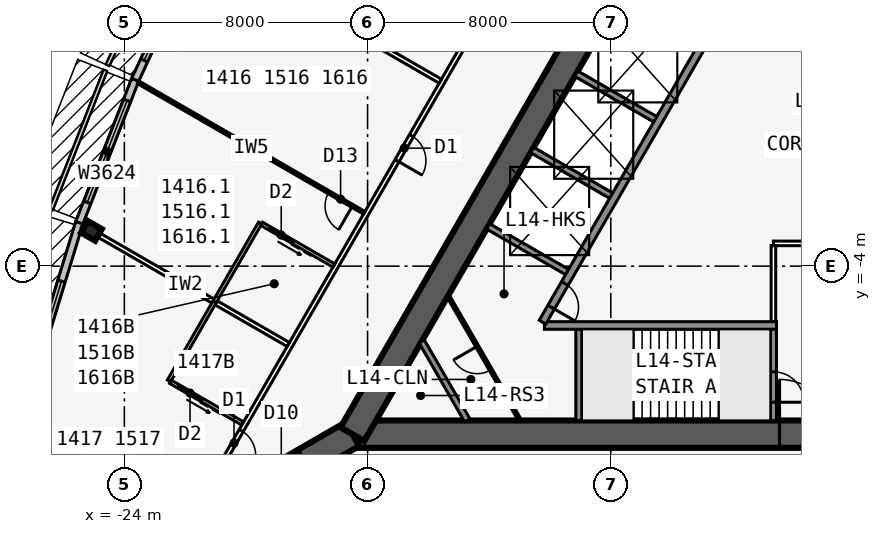
"""IFC4 building model, lengths in metres.
Left out: names, types, materials, properties, quantities, classifications, styles, units other than length and angle.
Written with IfcOpenShell. Run it as: python <this file> out.ifc"""

import sys

from ifc_helpers import new_model, si_unit, direction, frame, frame_2d, origin, origin_2d, place, context, subcontext, project, spatial, rectangle, i_section, extrude, element, fill, save


model = new_model("IFC4")
c1 = context("Model", 3, precision=1e-05, world=origin(), true_north=direction((0.0, 1.0)))
c2 = subcontext(c1, "Body", "Model", "MODEL_VIEW")
j1 = project(units=[si_unit("LENGTHUNIT", "METRE"), si_unit("PLANEANGLEUNIT", "RADIAN")], contexts=[c1])
p1 = place(None, origin())
s1 = spatial("IfcSite", under=j1, at=p1, CompositionType="ELEMENT")
p2 = place(p1, origin())
s2 = spatial("IfcBuilding", under=s1, at=p2, CompositionType="ELEMENT")
p3 = place(p2, frame((0.0, 0.0, 59.1)))
s3 = spatial("IfcBuildingStorey", under=s2, at=p3, CompositionType="ELEMENT", Elevation=59.1)
p4 = place(p3, frame((-16.5, -9.526, 0.0), z_axis=(0.0, 0.0, 1.0), x_axis=(1.0, 0.0, 0.0)))
e1 = element("IfcWall", 1, at=p4, inside=s3, PredefinedType="SHEAR", context=c2, shape_type="SweptSolid", body=[
    extrude(rectangle(XDim=33.0, YDim=0.9, at=frame_2d((16.5, 0.0))), origin(), (0.0, 0.0, 1.0), 3.4),
])
p5 = place(p4, frame((14.05, 0.0, 0.0)))
e2 = element("IfcOpeningElement", 2, at=p5, cuts=e1, PredefinedType="OPENING", context=c2, shape_type="SweptSolid", body=[
    extrude(rectangle(XDim=1.8, YDim=2.13, at=frame_2d((0.9, 1.065))), frame((0.0, 0.46, 0.0), z_axis=(0.0, -1.0, 0.0), x_axis=(1.0, 0.0, 0.0)), (0.0, 0.0, 1.0), 0.92),
])
p6 = place(p3, frame((-10.183, -5.951, 0.0), z_axis=(0.0, 0.0, 1.0), x_axis=(1.0, 0.0, 0.0)))
e3 = element("IfcWall", 3, at=p6, inside=s3, PredefinedType="SOLIDWALL", context=c2, shape_type="SweptSolid", body=[
    extrude(rectangle(XDim=7.633, YDim=0.25, at=frame_2d((3.816, 0.0))), origin(), (0.0, 0.0, 1.0), 3.235),
])
p7 = place(p3, frame((-9.05, -5.951, 0.0), z_axis=(0.0, 0.0, 1.0), x_axis=(0.0, -1.0, 0.0)))
e4 = element("IfcWall", 4, at=p7, inside=s3, PredefinedType="SOLIDWALL", context=c2, shape_type="SweptSolid", body=[
    extrude(rectangle(XDim=3.125, YDim=0.2, at=frame_2d((1.562, 0.0))), origin(), (0.0, 0.0, 1.0), 3.235),
])
p8 = place(p3, frame((-2.65, -5.951, 0.0), z_axis=(0.0, 0.0, 1.0), x_axis=(0.0, -1.0, 0.0)))
e5 = element("IfcWall", 5, at=p8, inside=s3, PredefinedType="SOLIDWALL", context=c2, shape_type="SweptSolid", body=[
    extrude(rectangle(XDim=3.125, YDim=0.2, at=frame_2d((1.562, 0.0))), origin(), (0.0, 0.0, 1.0), 3.235),
])
p9 = place(p8, frame((1.525, 0.0, 0.0)))
e6 = element("IfcOpeningElement", 6, at=p9, cuts=e5, PredefinedType="OPENING", context=c2, shape_type="SweptSolid", body=[
    extrude(rectangle(XDim=1.0, YDim=2.13, at=frame_2d((0.5, 1.065))), frame((0.0, 0.11, 0.0), z_axis=(0.0, -1.0, 0.0), x_axis=(1.0, 0.0, 0.0)), (0.0, 0.0, 1.0), 0.22),
])
p10 = place(p3, frame((0.0, 19.052, 0.0), z_axis=(0.0, 0.0, 1.0), x_axis=(-0.499999749417, -0.866025548458, 0.0)))
e7 = element("IfcWall", 7, at=p10, inside=s3, PredefinedType="SHEAR", context=c2, shape_type="SweptSolid", body=[
    extrude(rectangle(XDim=33.0, YDim=0.9, at=frame_2d((16.5, 0.0))), origin(), (0.0, 0.0, 1.0), 3.4),
])
p11 = place(p10, frame((14.15, 0.0, 0.0)))
e8 = element("IfcOpeningElement", 8, at=p11, cuts=e7, PredefinedType="OPENING", context=c2, shape_type="SweptSolid", body=[
    extrude(rectangle(XDim=1.8, YDim=2.13, at=frame_2d((0.9, 1.065))), frame((0.0, 0.46, 0.0), z_axis=(0.0, -1.0, 0.0), x_axis=(1.0, 0.0, 0.0)), (0.0, 0.0, 1.0), 0.92),
])
p12 = place(p10, frame((12.6, 0.0, 0.0)))
e9 = element("IfcOpeningElement", 9, at=p12, cuts=e7, PredefinedType="OPENING", context=c2, shape_type="SweptSolid", body=[
    extrude(rectangle(XDim=1.0, YDim=2.13, at=frame_2d((0.5, 1.065))), frame((0.0, 0.46, 0.0), z_axis=(0.0, -1.0, 0.0), x_axis=(1.0, 0.0, 0.0)), (0.0, 0.0, 1.0), 0.92),
])
p13 = place(p3, frame((-4.929, 3.365, 0.0), z_axis=(0.0, 0.0, 1.0), x_axis=(-0.499991433582, -0.866030349552, 0.0)))
e10 = element("IfcWall", 10, at=p13, inside=s3, PredefinedType="SOLIDWALL", context=c2, shape_type="SweptSolid", body=[
    extrude(rectangle(XDim=10.633, YDim=0.25, at=frame_2d((5.316, 0.0))), origin(), (0.0, 0.0, 1.0), 3.235),
])
p14 = place(p13, frame((9.164, 0.0, 0.0)))
e11 = element("IfcOpeningElement", 11, at=p14, cuts=e10, PredefinedType="OPENING", context=c2, shape_type="SweptSolid", body=[
    extrude(rectangle(XDim=0.9, YDim=2.13, at=frame_2d((0.45, 1.065))), frame((0.0, 0.135, 0.0), z_axis=(0.0, -1.0, 0.0), x_axis=(1.0, 0.0, 0.0)), (0.0, 0.0, 1.0), 0.27),
])
for number, where, z_axis, x_axis in (
    (12, (-6.429, 0.767, 0.0), (0.0, 0.0, 1.0), (-0.866, 0.5, 0.0)),
    (13, (-7.879, -1.744, 0.0), (0.0, 0.0, 1.0), (-0.866, 0.5, 0.0)),
    (14, (-9.329, -4.256, 0.0), (0.0, 0.0, 1.0), (-0.866, 0.5, 0.0)),
):
    element("IfcWall", number, at=place(p3, frame(where, z_axis=z_axis, x_axis=x_axis)), inside=s3, PredefinedType="SOLIDWALL", context=c2, shape_type="SweptSolid", body=[
        extrude(rectangle(XDim=3.125, YDim=0.2, at=frame_2d((1.562, 0.0))), origin(), (0.0, 0.0, 1.0), 3.235),
    ])
p15 = place(p3, frame((-16.5, -9.526, 0.0), z_axis=(0.0, 0.0, 1.0), x_axis=(-0.866031398331, -0.499989616998, 0.0)))
e15 = element("IfcWall", 15, at=p15, inside=s3, PredefinedType="SHEAR", context=c2, shape_type="SweptSolid", body=[
    extrude(rectangle(XDim=4.746, YDim=0.9, at=frame_2d((2.373, 0.0))), origin(), (0.0, 0.0, 1.0), 3.4),
])
p16 = place(p15, frame((1.8, 0.0, 0.0)))
e16 = element("IfcOpeningElement", 16, at=p16, cuts=e15, PredefinedType="OPENING", context=c2, shape_type="SweptSolid", body=[
    extrude(rectangle(XDim=1.8, YDim=2.13, at=frame_2d((0.9, 1.065))), frame((0.0, 0.46, 0.0), z_axis=(0.0, -1.0, 0.0), x_axis=(1.0, 0.0, 0.0)), (0.0, 0.0, 1.0), 0.92),
])
p17 = place(p3, frame((-25.083, -2.839, 0.0), z_axis=(0.0, 0.0, 1.0), x_axis=(-0.5, -0.866025403784, 0.0)))
e17 = element("IfcColumn", 17, at=p17, inside=s3, PredefinedType="COLUMN", context=c2, shape_type="SweptSolid", body=[
    extrude(i_section(OverallWidth=0.442, OverallDepth=0.531, WebThickness=0.066, FlangeThickness=0.106, at=origin_2d()), origin(), (0.0, 0.0, 1.0), 3.4),
])
p18 = place(p3, frame((-21.543, 6.678, 0.0), z_axis=(0.0, 0.0, 1.0), x_axis=(-0.419203100754, -0.907892482796, 0.0)))
e18 = element("IfcWall", 18, at=p18, inside=s3, PredefinedType="STANDARD", context=c2, shape_type="SweptSolid", body=[
    extrude(rectangle(XDim=5.021, YDim=0.25, at=frame_2d((2.51, 0.0))), origin(), (0.0, 0.0, 1.0), 3.235),
])
p19 = place(p18, frame((0.71, 0.0, 0.45)))
e19 = element("IfcOpeningElement", 19, at=p19, cuts=e18, PredefinedType="OPENING", context=c2, shape_type="SweptSolid", body=[
    extrude(rectangle(XDim=3.6, YDim=2.4, at=frame_2d((1.8, 1.2))), frame((0.0, 0.135, 0.0), z_axis=(0.0, -1.0, 0.0), x_axis=(1.0, 0.0, 0.0)), (0.0, 0.0, 1.0), 0.27),
])
p20 = place(p3, frame((-23.645, 2.126, 0.0), z_axis=(0.0, 0.0, 1.0), x_axis=(-0.364013463868, -0.931393685894, 0.0)))
e20 = element("IfcWall", 20, at=p20, inside=s3, PredefinedType="STANDARD", context=c2, shape_type="SweptSolid", body=[
    extrude(rectangle(XDim=5.058, YDim=0.25, at=frame_2d((2.529, 0.0))), origin(), (0.0, 0.0, 1.0), 3.235),
])
p21 = place(p20, frame((0.729, 0.0, 0.45)))
e21 = element("IfcOpeningElement", 21, at=p21, cuts=e20, PredefinedType="OPENING", context=c2, shape_type="SweptSolid", body=[
    extrude(rectangle(XDim=3.6, YDim=2.4, at=frame_2d((1.8, 1.2))), frame((0.0, 0.135, 0.0), z_axis=(0.0, -1.0, 0.0), x_axis=(1.0, 0.0, 0.0)), (0.0, 0.0, 1.0), 0.27),
])
p22 = place(p3, frame((-25.483, -2.575, 0.0), z_axis=(0.0, 0.0, 1.0), x_axis=(-0.2919790669, -0.956424709265, 0.0)))
e22 = element("IfcWall", 22, at=p22, inside=s3, PredefinedType="STANDARD", context=c2, shape_type="SweptSolid", body=[
    extrude(rectangle(XDim=8.211, YDim=0.25, at=frame_2d((4.105, 0.0))), origin(), (0.0, 0.0, 1.0), 3.235),
])
p23 = place(p22, frame((2.006, 0.0, 0.45)))
e23 = element("IfcOpeningElement", 23, at=p23, cuts=e22, PredefinedType="OPENING", context=c2, shape_type="SweptSolid", body=[
    extrude(rectangle(XDim=4.2, YDim=2.4, at=frame_2d((2.1, 1.2))), frame((0.0, 0.135, 0.0), z_axis=(0.0, -1.0, 0.0), x_axis=(1.0, 0.0, 0.0)), (0.0, 0.0, 1.0), 0.27),
])
p24 = place(p3, frame((-0.5, 24.636, 0.0), z_axis=(0.0, 0.0, 1.0), x_axis=(-0.500001915564, -0.86602429783, 0.0)))
e24 = element("IfcWall", 24, at=p24, inside=s3, PredefinedType="PARTITIONING", context=c2, shape_type="SweptSolid", body=[
    extrude(rectangle(XDim=42.172, YDim=0.15, at=frame_2d((21.086, 0.0))), origin(), (0.0, 0.0, 1.0), 3.235),
])
p25 = place(p24, frame((2.338, 0.0, 0.0)))
e25 = element("IfcOpeningElement", 25, at=p25, cuts=e24, PredefinedType="OPENING", context=c2, shape_type="SweptSolid", body=[
    extrude(rectangle(XDim=0.95, YDim=2.13, at=frame_2d((0.475, 1.065))), frame((0.0, 0.085, 0.0), z_axis=(0.0, -1.0, 0.0), x_axis=(1.0, 0.0, 0.0)), (0.0, 0.0, 1.0), 0.17),
])
p26 = place(p24, frame((12.511, 0.0, 0.0)))
e26 = element("IfcOpeningElement", 26, at=p26, cuts=e24, PredefinedType="OPENING", context=c2, shape_type="SweptSolid", body=[
    extrude(rectangle(XDim=0.95, YDim=2.13, at=frame_2d((0.475, 1.065))), frame((0.0, 0.085, 0.0), z_axis=(0.0, -1.0, 0.0), x_axis=(1.0, 0.0, 0.0)), (0.0, 0.0, 1.0), 0.17),
])
p27 = place(p24, frame((19.311, 0.0, 0.0)))
e27 = element("IfcOpeningElement", 27, at=p27, cuts=e24, PredefinedType="OPENING", context=c2, shape_type="SweptSolid", body=[
    extrude(rectangle(XDim=0.95, YDim=2.13, at=frame_2d((0.475, 1.065))), frame((0.0, 0.085, 0.0), z_axis=(0.0, -1.0, 0.0), x_axis=(1.0, 0.0, 0.0)), (0.0, 0.0, 1.0), 0.17),
])
p28 = place(p24, frame((28.111, 0.0, 0.0)))
e28 = element("IfcOpeningElement", 28, at=p28, cuts=e24, PredefinedType="OPENING", context=c2, shape_type="SweptSolid", body=[
    extrude(rectangle(XDim=0.95, YDim=2.13, at=frame_2d((0.475, 1.065))), frame((0.0, 0.085, 0.0), z_axis=(0.0, -1.0, 0.0), x_axis=(1.0, 0.0, 0.0)), (0.0, 0.0, 1.0), 0.17),
])
p29 = place(p24, frame((39.311, 0.0, 0.0)))
e29 = element("IfcOpeningElement", 29, at=p29, cuts=e24, PredefinedType="OPENING", context=c2, shape_type="SweptSolid", body=[
    extrude(rectangle(XDim=0.95, YDim=2.13, at=frame_2d((0.475, 1.065))), frame((0.0, 0.085, 0.0), z_axis=(0.0, -1.0, 0.0), x_axis=(1.0, 0.0, 0.0)), (0.0, 0.0, 1.0), 0.17),
])
p30 = place(p3, frame((-13.608, 2.083, 0.0), z_axis=(0.0, 0.0, 1.0), x_axis=(-0.866028232062, 0.499995101247, 0.0)))
e30 = element("IfcWall", 30, at=p30, inside=s3, PredefinedType="PARTITIONING", context=c2, shape_type="SweptSolid", body=[
    extrude(rectangle(XDim=9.043, YDim=0.15, at=frame_2d((4.521, 0.0))), origin(), (0.0, 0.0, 1.0), 2.389),
])
p31 = place(p3, frame((-16.108, -2.247, 0.0), z_axis=(0.0, 0.0, 1.0), x_axis=(-0.866018881988, 0.500011295912, 0.0)))
e31 = element("IfcWall", 31, at=p31, inside=s3, PredefinedType="PARTITIONING", context=c2, shape_type="SweptSolid", body=[
    extrude(rectangle(XDim=8.585, YDim=0.1, at=frame_2d((4.292, 0.0))), origin(), (0.0, 0.0, 1.0), 2.389),
])
p32 = place(p31, frame((0.45, 0.0, 0.0)))
e32 = element("IfcOpeningElement", 32, at=p32, cuts=e31, PredefinedType="OPENING", context=c2, shape_type="SweptSolid", body=[
    extrude(rectangle(XDim=0.9, YDim=2.13, at=frame_2d((0.45, 1.065))), frame((0.0, 0.06, 0.0), z_axis=(0.0, -1.0, 0.0), x_axis=(1.0, 0.0, 0.0)), (0.0, 0.0, 1.0), 0.12),
])
p33 = place(p3, frame((-18.608, -6.577, 0.0), z_axis=(0.0, 0.0, 1.0), x_axis=(-0.866034818847, 0.499983692279, 0.0)))
e33 = element("IfcWall", 33, at=p33, inside=s3, PredefinedType="PARTITIONING", context=c2, shape_type="SweptSolid", body=[
    extrude(rectangle(XDim=7.82, YDim=0.15, at=frame_2d((3.91, 0.0))), origin(), (0.0, 0.0, 1.0), 2.389),
])
p34 = place(p3, frame((-19.533, -2.579, 0.0), z_axis=(0.0, 0.0, 1.0), x_axis=(-0.499990139034, -0.866031096941, 0.0)))
e34 = element("IfcWall", 34, at=p34, inside=s3, PredefinedType="PLUMBINGWALL", context=c2, shape_type="SweptSolid", body=[
    extrude(rectangle(XDim=3.0, YDim=0.12, at=frame_2d((1.5, 0.0))), origin(), (0.0, 0.0, 1.0), 3.235),
])
p35 = place(p3, frame((-17.108, -3.979, 0.0), z_axis=(0.0, 0.0, 1.0), x_axis=(-0.865997131366, 0.500048966069, 0.0)))
e35 = element("IfcWall", 35, at=p35, inside=s3, PredefinedType="PLUMBINGWALL", context=c2, shape_type="SweptSolid", body=[
    extrude(rectangle(XDim=2.74, YDim=0.12, at=frame_2d((1.37, 0.0))), origin(), (0.0, 0.0, 1.0), 3.235),
])
p36 = place(p35, frame((1.55, 0.0, 0.0)))
e36 = element("IfcOpeningElement", 36, at=p36, cuts=e35, PredefinedType="OPENING", context=c2, shape_type="SweptSolid", body=[
    extrude(rectangle(XDim=0.9, YDim=2.13, at=frame_2d((0.45, 1.065))), frame((0.0, 0.07, 0.0), z_axis=(0.0, -1.0, 0.0), x_axis=(1.0, 0.0, 0.0)), (0.0, 0.0, 1.0), 0.14),
])
p37 = place(p3, frame((-21.033, -5.177, 0.0), z_axis=(0.0, 0.0, 1.0), x_axis=(-0.499990139034, -0.866031096941, 0.0)))
e37 = element("IfcWall", 37, at=p37, inside=s3, PredefinedType="PLUMBINGWALL", context=c2, shape_type="SweptSolid", body=[
    extrude(rectangle(XDim=3.0, YDim=0.12, at=frame_2d((1.5, 0.0))), origin(), (0.0, 0.0, 1.0), 3.235),
])
p38 = place(p3, frame((-20.108, -9.175, 0.0), z_axis=(0.0, 0.0, 1.0), x_axis=(-0.866035715982, 0.499982138324, 0.0)))
e38 = element("IfcWall", 38, at=p38, inside=s3, PredefinedType="PLUMBINGWALL", context=c2, shape_type="SweptSolid", body=[
    extrude(rectangle(XDim=2.74, YDim=0.12, at=frame_2d((1.37, 0.0))), origin(), (0.0, 0.0, 1.0), 3.235),
])
p39 = place(p38, frame((1.55, 0.0, 0.0)))
e39 = element("IfcOpeningElement", 39, at=p39, cuts=e38, PredefinedType="OPENING", context=c2, shape_type="SweptSolid", body=[
    extrude(rectangle(XDim=0.9, YDim=2.13, at=frame_2d((0.45, 1.065))), frame((0.0, 0.07, 0.0), z_axis=(0.0, -1.0, 0.0), x_axis=(1.0, 0.0, 0.0)), (0.0, 0.0, 1.0), 0.14),
])
p40 = place(p3, frame((-2.65, -3.251, 0.0), z_axis=(0.0, 0.0, 1.0), x_axis=(1.0, 0.0, 0.0)))
e40 = element("IfcWall", 40, at=p40, inside=s3, PredefinedType="PARTITIONING", context=c2, shape_type="SweptSolid", body=[
    extrude(rectangle(XDim=8.35, YDim=0.15, at=frame_2d((4.175, 0.0))), origin(), (0.0, 0.0, 1.0), 3.235),
])
p41 = place(p3, frame((-2.65, -5.826, 0.0), z_axis=(0.0, 0.0, 1.0), x_axis=(0.0, 1.0, 0.0)))
e41 = element("IfcWall", 41, at=p41, inside=s3, PredefinedType="PARTITIONING", context=c2, shape_type="SweptSolid", body=[
    extrude(rectangle(XDim=2.5, YDim=0.15, at=frame_2d((1.25, 0.0))), origin(), (0.0, 0.0, 1.0), 3.235),
])
p42 = place(p3, frame((-12.719, -9.076, 0.0), z_axis=(0.0, 0.0, 1.0), x_axis=(-0.499952404951, 0.866052881055, 0.0)))
e42 = element("IfcWall", 42, at=p42, inside=s3, PredefinedType="SOLIDWALL", context=c2, shape_type="SweptSolid", body=[
    extrude(rectangle(XDim=3.002, YDim=0.2, at=frame_2d((1.501, 0.0))), origin(), (0.0, 0.0, 1.0), 3.235),
])
p43 = place(p3, frame((-10.986, -9.076, 0.0), z_axis=(0.0, 0.0, 1.0), x_axis=(-0.499999210213, 0.866025859768, 0.0)))
e43 = element("IfcWall", 43, at=p43, inside=s3, PredefinedType="PARTITIONING", context=c2, shape_type="SweptSolid", body=[
    extrude(rectangle(XDim=4.734, YDim=0.1, at=frame_2d((2.367, 0.0))), origin(), (0.0, 0.0, 1.0), 3.235),
])
p44 = place(p43, frame((1.917, 0.0, 0.0)))
e44 = element("IfcOpeningElement", 44, at=p44, cuts=e43, PredefinedType="OPENING", context=c2, shape_type="SweptSolid", body=[
    extrude(rectangle(XDim=0.9, YDim=2.13, at=frame_2d((0.45, 1.065))), frame((0.0, 0.06, 0.0), z_axis=(0.0, -1.0, 0.0), x_axis=(1.0, 0.0, 0.0)), (0.0, 0.0, 1.0), 0.12),
])
p45 = place(p3, frame((-7.247, -7.576, 0.0), z_axis=(0.0, 0.0, 1.0), x_axis=(1.0, 0.0, 0.0)))
e45 = element("IfcWall", 45, at=p45, inside=s3, PredefinedType="SOLIDWALL", context=c2, shape_type="SweptSolid", body=[
    extrude(rectangle(XDim=2.794, YDim=0.1, at=frame_2d((1.397, 0.0))), origin(), (0.0, 0.0, 1.0), 3.4),
])
p46 = place(p19, origin())
e46 = element("IfcWindow", 46, at=p46, inside=s3, PartitioningType="SINGLE_PANEL", PredefinedType="WINDOW", context=c2, shape_type="SweptSolid", body=[
    extrude(rectangle(XDim=3.6, YDim=2.4, at=frame_2d((1.8, 1.2))), frame((0.0, 0.03, 0.0), z_axis=(0.0, -1.0, 0.0), x_axis=(1.0, 0.0, 0.0)), (0.0, 0.0, 1.0), 0.06),
])
fill(e19, e46)
p47 = place(p21, origin())
e47 = element("IfcWindow", 47, at=p47, inside=s3, PartitioningType="SINGLE_PANEL", PredefinedType="WINDOW", context=c2, shape_type="SweptSolid", body=[
    extrude(rectangle(XDim=3.6, YDim=2.4, at=frame_2d((1.8, 1.2))), frame((0.0, 0.03, 0.0), z_axis=(0.0, -1.0, 0.0), x_axis=(1.0, 0.0, 0.0)), (0.0, 0.0, 1.0), 0.06),
])
fill(e21, e47)
p48 = place(p23, origin())
e48 = element("IfcWindow", 48, at=p48, inside=s3, PartitioningType="SINGLE_PANEL", PredefinedType="WINDOW", context=c2, shape_type="SweptSolid", body=[
    extrude(rectangle(XDim=4.2, YDim=2.4, at=frame_2d((2.1, 1.2))), frame((0.0, 0.03, 0.0), z_axis=(0.0, -1.0, 0.0), x_axis=(1.0, 0.0, 0.0)), (0.0, 0.0, 1.0), 0.06),
])
fill(e23, e48)
p49 = place(p32, origin())
e49 = element("IfcDoor", 49, at=p49, inside=s3, OperationType="SINGLE_SWING_LEFT", PredefinedType="DOOR", context=c2, shape_type="SweptSolid", body=[
    extrude(rectangle(XDim=0.9, YDim=2.13, at=frame_2d((0.45, 1.065))), frame((0.0, 0.025, 0.0), z_axis=(0.0, -1.0, 0.0), x_axis=(1.0, 0.0, 0.0)), (0.0, 0.0, 1.0), 0.05),
])
fill(e32, e49)
p50 = place(p28, origin())
e50 = element("IfcDoor", 50, at=p50, inside=s3, OperationType="SINGLE_SWING_RIGHT", PredefinedType="DOOR", context=c2, shape_type="SweptSolid", body=[
    extrude(rectangle(XDim=0.95, YDim=2.13, at=frame_2d((0.475, 1.065))), frame((0.0, 0.025, 0.0), z_axis=(0.0, -1.0, 0.0), x_axis=(1.0, 0.0, 0.0)), (0.0, 0.0, 1.0), 0.05),
])
fill(e28, e50)
p51 = place(p36, origin())
e51 = element("IfcDoor", 51, at=p51, inside=s3, OperationType="SLIDING_TO_LEFT", PredefinedType="DOOR", context=c2, shape_type="SweptSolid", body=[
    extrude(rectangle(XDim=0.9, YDim=2.13, at=frame_2d((0.45, 1.065))), frame((0.0, 0.025, 0.0), z_axis=(0.0, -1.0, 0.0), x_axis=(1.0, 0.0, 0.0)), (0.0, 0.0, 1.0), 0.05),
])
fill(e36, e51)
p52 = place(p39, origin())
e52 = element("IfcDoor", 52, at=p52, inside=s3, OperationType="SLIDING_TO_LEFT", PredefinedType="DOOR", context=c2, shape_type="SweptSolid", body=[
    extrude(rectangle(XDim=0.9, YDim=2.13, at=frame_2d((0.45, 1.065))), frame((0.0, 0.025, 0.0), z_axis=(0.0, -1.0, 0.0), x_axis=(1.0, 0.0, 0.0)), (0.0, 0.0, 1.0), 0.05),
])
fill(e39, e52)
p53 = place(p29, origin())
e53 = element("IfcDoor", 53, at=p53, inside=s3, OperationType="SINGLE_SWING_RIGHT", PredefinedType="DOOR", context=c2, shape_type="SweptSolid", body=[
    extrude(rectangle(XDim=0.95, YDim=2.13, at=frame_2d((0.475, 1.065))), frame((0.0, 0.025, 0.0), z_axis=(0.0, -1.0, 0.0), x_axis=(1.0, 0.0, 0.0)), (0.0, 0.0, 1.0), 0.05),
])
fill(e29, e53)
p54 = place(p5, origin())
e54 = element("IfcDoor", 54, at=p54, inside=s3, OperationType="DOUBLE_DOOR_SINGLE_SWING", PredefinedType="DOOR", context=c2, shape_type="SweptSolid", body=[
    extrude(rectangle(XDim=1.8, YDim=2.13, at=frame_2d((0.9, 1.065))), frame((0.0, 0.025, 0.0), z_axis=(0.0, -1.0, 0.0), x_axis=(1.0, 0.0, 0.0)), (0.0, 0.0, 1.0), 0.05),
])
fill(e2, e54)
p55 = place(p9, origin())
e55 = element("IfcDoor", 55, at=p55, inside=s3, OperationType="SINGLE_SWING_RIGHT", PredefinedType="DOOR", context=c2, shape_type="SweptSolid", body=[
    extrude(rectangle(XDim=1.0, YDim=2.13, at=frame_2d((0.5, 1.065))), frame((0.0, 0.025, 0.0), z_axis=(0.0, -1.0, 0.0), x_axis=(1.0, 0.0, 0.0)), (0.0, 0.0, 1.0), 0.05),
])
fill(e6, e55)
p56 = place(p44, origin())
e56 = element("IfcDoor", 56, at=p56, inside=s3, OperationType="SINGLE_SWING_RIGHT", PredefinedType="DOOR", context=c2, shape_type="SweptSolid", body=[
    extrude(rectangle(XDim=0.9, YDim=2.13, at=frame_2d((0.45, 1.065))), frame((0.0, 0.025, 0.0), z_axis=(0.0, -1.0, 0.0), x_axis=(1.0, 0.0, 0.0)), (0.0, 0.0, 1.0), 0.05),
])
fill(e44, e56)
p57 = place(p14, origin())
e57 = element("IfcDoor", 57, at=p57, inside=s3, OperationType="SINGLE_SWING_RIGHT", PredefinedType="DOOR", context=c2, shape_type="SweptSolid", body=[
    extrude(rectangle(XDim=0.9, YDim=2.13, at=frame_2d((0.45, 1.065))), frame((0.0, 0.025, 0.0), z_axis=(0.0, -1.0, 0.0), x_axis=(1.0, 0.0, 0.0)), (0.0, 0.0, 1.0), 0.05),
])
fill(e11, e57)
save(model, sys.argv[1])
